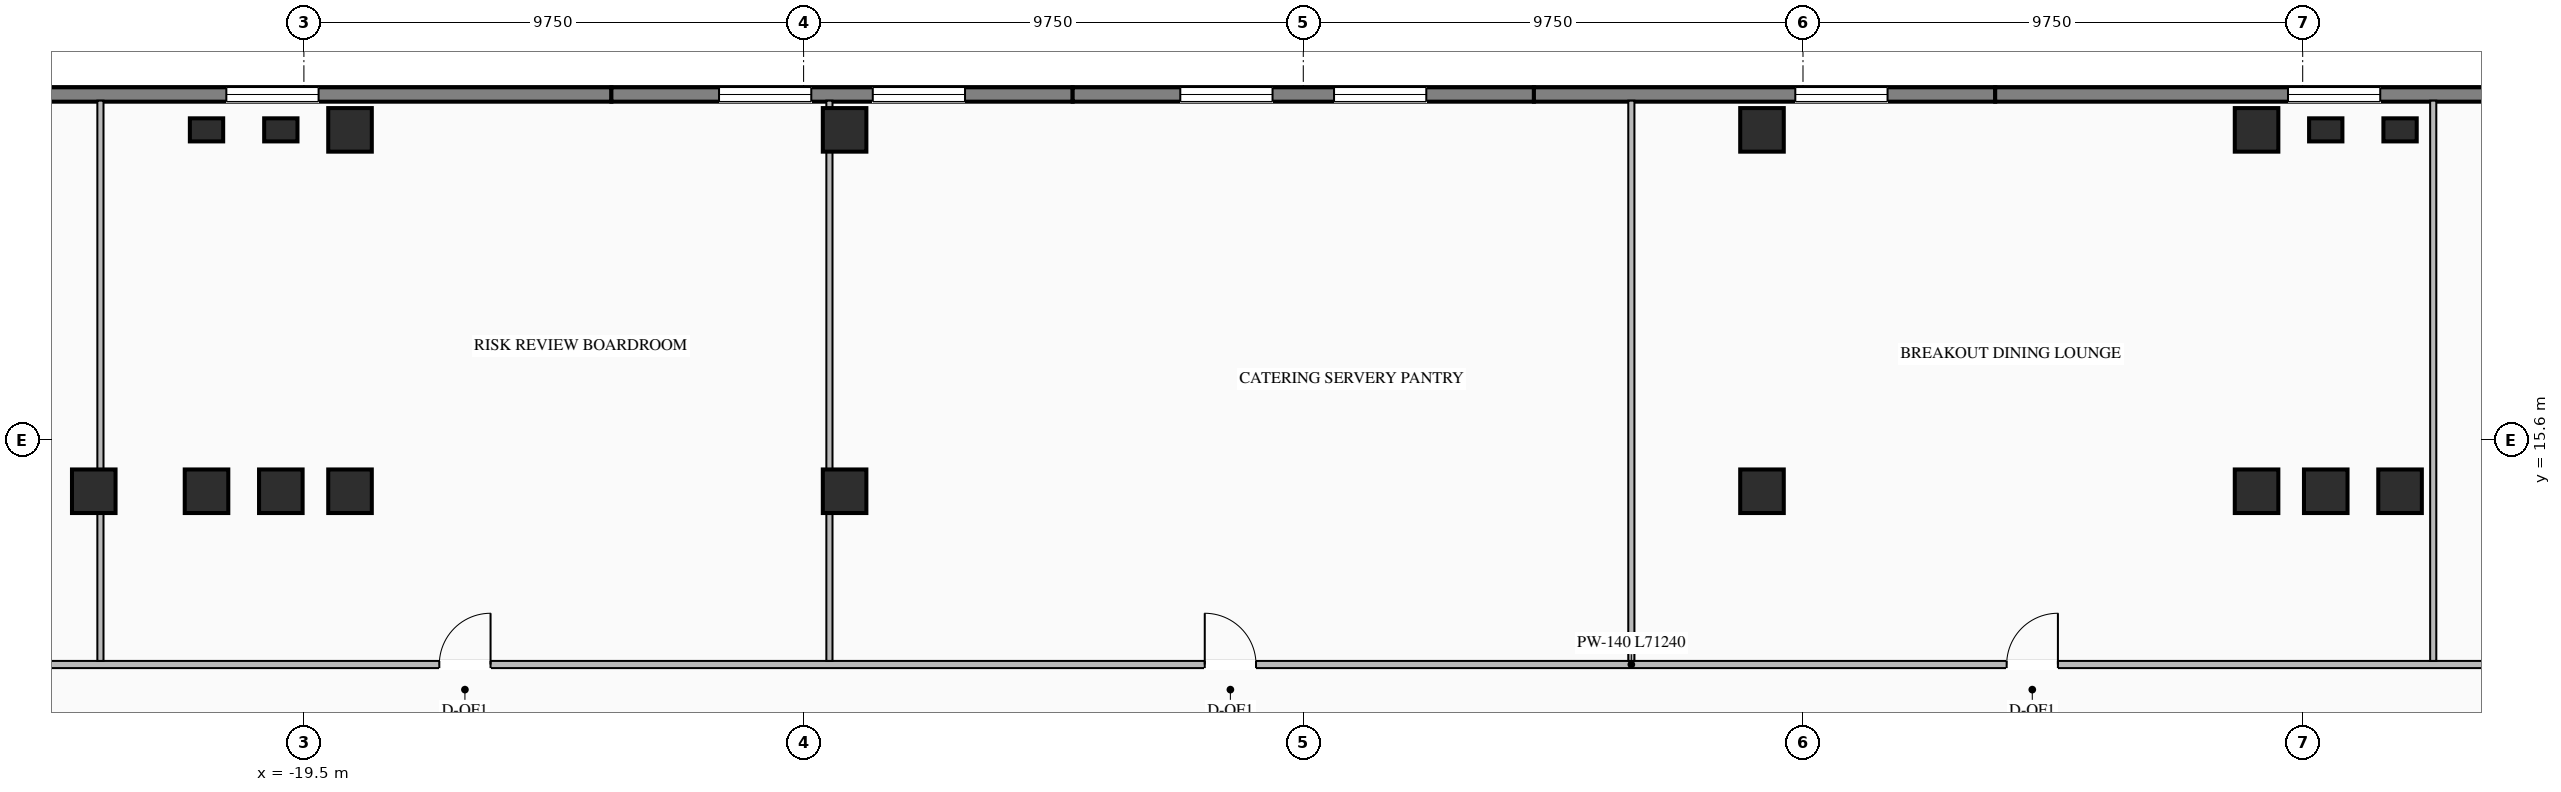
"""IFC4 building model, lengths in metres.
Left out: names, types, materials, properties, quantities, classifications, styles, units other than length and angle.
Written with IfcOpenShell. Run it as: python <this file> out.ifc"""

import sys

from ifc_helpers import new_model, si_unit, direction, frame, frame_2d, origin, origin_2d, place, context, subcontext, project, spatial, rectangle, i_section, extrude, element, fill, save


model = new_model("IFC4")
c1 = context("Model", 3, precision=1e-05, world=origin(), true_north=direction((0.0, 1.0)))
c2 = subcontext(c1, "Body", "Model", "MODEL_VIEW")
j1 = project(units=[si_unit("LENGTHUNIT", "METRE"), si_unit("PLANEANGLEUNIT", "RADIAN")], contexts=[c1])
p1 = place(None, origin())
s1 = spatial("IfcSite", under=j1, at=p1, CompositionType="ELEMENT")
p2 = place(p1, origin())
s2 = spatial("IfcBuilding", under=s1, at=p2, CompositionType="ELEMENT")
p3 = place(p2, frame((0.0, 0.0, 41.55)))
s3 = spatial("IfcBuildingStorey", under=s2, at=p3, CompositionType="ELEMENT", Elevation=41.55)
for number, where, z_axis, x_axis in (
    (1, (-21.4, 14.6, 0.0), (0.0, 0.0, 1.0), (1.0, 0.0, 0.0)),
    (2, (-19.95, 14.6, 0.0), (0.0, 0.0, 1.0), (1.0, 0.0, 0.0)),
    (3, (-18.6, 14.6, 0.0), (0.0, 0.0, 1.0), (1.0, 0.0, 0.0)),
    (4, (-8.95, 14.6, 0.0), (0.0, 0.0, 1.0), (1.0, 0.0, 0.0)),
    (5, (8.95, 14.6, 0.0), (0.0, 0.0, 1.0), (1.0, 0.0, 0.0)),
    (6, (18.6, 14.6, 0.0), (0.0, 0.0, 1.0), (1.0, 0.0, 0.0)),
    (7, (19.95, 14.6, 0.0), (0.0, 0.0, 1.0), (1.0, 0.0, 0.0)),
    (8, (21.4, 14.6, 0.0), (0.0, 0.0, 1.0), (1.0, 0.0, 0.0)),
    (9, (-23.6, 14.6, 0.0), (0.0, 0.0, 1.0), (1.0, 0.0, 0.0)),
    (10, (-18.6, 21.65, 0.0), (0.0, 0.0, 1.0), (1.0, 0.0, 0.0)),
    (11, (-8.95, 21.65, 0.0), (0.0, 0.0, 1.0), (1.0, 0.0, 0.0)),
    (12, (8.95, 21.65, 0.0), (0.0, 0.0, 1.0), (1.0, 0.0, 0.0)),
    (13, (18.6, 21.65, 0.0), (0.0, 0.0, 1.0), (1.0, 0.0, 0.0)),
):
    element("IfcColumn", number, at=place(p3, frame(where, z_axis=z_axis, x_axis=x_axis)), inside=s3, PredefinedType="COLUMN", context=c2, shape_type="SweptSolid", body=[
        extrude(i_section(OverallWidth=0.85, OverallDepth=0.85, WebThickness=0.032, FlangeThickness=0.048, at=origin_2d()), origin(), (0.0, 0.0, 1.0), 3.45),
    ])
for number, where, z_axis, x_axis in (
    (14, (-21.4, 21.65, 0.0), (0.0, 0.0, 1.0), (1.0, 0.0, 0.0)),
    (15, (-19.95, 21.65, 0.0), (0.0, 0.0, 1.0), (1.0, 0.0, 0.0)),
    (16, (19.95, 21.65, 0.0), (0.0, 0.0, 1.0), (1.0, 0.0, 0.0)),
    (17, (21.4, 21.65, 0.0), (0.0, 0.0, 1.0), (1.0, 0.0, 0.0)),
):
    element("IfcColumn", number, at=place(p3, frame(where, z_axis=z_axis, x_axis=x_axis)), inside=s3, PredefinedType="PILASTER", context=c2, shape_type="SweptSolid", body=[
        extrude(rectangle(XDim=0.65, YDim=0.45, at=origin_2d()), origin(), (0.0, 0.0, 1.0), 3.45),
    ])
p4 = place(p3, frame((-33.34, 22.34, 0.0), z_axis=(0.0, 0.0, 1.0), x_axis=(1.0, 0.0, 0.0)))
e18 = element("IfcWall", 18, at=p4, inside=s3, PredefinedType="STANDARD", context=c2, shape_type="SweptSolid", body=[
    extrude(rectangle(XDim=19.84, YDim=0.28, at=frame_2d((9.92, 0.0))), origin(), (0.0, 0.0, 1.0), 3.25),
])
p5 = place(p4, frame((5.713, 0.0, 0.76)))
e19 = element("IfcOpeningElement", 19, at=p5, cuts=e18, PredefinedType="OPENING", context=c2, shape_type="SweptSolid", body=[
    extrude(rectangle(XDim=1.8, YDim=1.95, at=frame_2d((0.9, 0.975))), frame((0.0, 0.15, 0.0), z_axis=(0.0, -1.0, 0.0), x_axis=(1.0, 0.0, 0.0)), (0.0, 0.0, 1.0), 0.3),
])
p6 = place(p4, frame((12.327, 0.0, 0.76)))
e20 = element("IfcOpeningElement", 20, at=p6, cuts=e18, PredefinedType="OPENING", context=c2, shape_type="SweptSolid", body=[
    extrude(rectangle(XDim=1.8, YDim=1.95, at=frame_2d((0.9, 0.975))), frame((0.0, 0.15, 0.0), z_axis=(0.0, -1.0, 0.0), x_axis=(1.0, 0.0, 0.0)), (0.0, 0.0, 1.0), 0.3),
])
p7 = place(p3, frame((-13.5, 22.34, 0.0), z_axis=(0.0, 0.0, 1.0), x_axis=(1.0, 0.0, 0.0)))
e21 = element("IfcWall", 21, at=p7, inside=s3, PredefinedType="STANDARD", context=c2, shape_type="SweptSolid", body=[
    extrude(rectangle(XDim=9.0, YDim=0.28, at=frame_2d((4.5, 0.0))), origin(), (0.0, 0.0, 1.0), 3.25),
])
p8 = place(p7, frame((2.1, 0.0, 0.76)))
e22 = element("IfcOpeningElement", 22, at=p8, cuts=e21, PredefinedType="OPENING", context=c2, shape_type="SweptSolid", body=[
    extrude(rectangle(XDim=1.8, YDim=1.95, at=frame_2d((0.9, 0.975))), frame((0.0, 0.15, 0.0), z_axis=(0.0, -1.0, 0.0), x_axis=(1.0, 0.0, 0.0)), (0.0, 0.0, 1.0), 0.3),
])
p9 = place(p7, frame((5.1, 0.0, 0.76)))
e23 = element("IfcOpeningElement", 23, at=p9, cuts=e21, PredefinedType="OPENING", context=c2, shape_type="SweptSolid", body=[
    extrude(rectangle(XDim=1.8, YDim=1.95, at=frame_2d((0.9, 0.975))), frame((0.0, 0.15, 0.0), z_axis=(0.0, -1.0, 0.0), x_axis=(1.0, 0.0, 0.0)), (0.0, 0.0, 1.0), 0.3),
])
p10 = place(p3, frame((-4.5, 22.34, 0.0), z_axis=(0.0, 0.0, 1.0), x_axis=(1.0, 0.0, 0.0)))
e24 = element("IfcWall", 24, at=p10, inside=s3, PredefinedType="STANDARD", context=c2, shape_type="SweptSolid", body=[
    extrude(rectangle(XDim=9.0, YDim=0.28, at=frame_2d((4.5, 0.0))), origin(), (0.0, 0.0, 1.0), 3.25),
])
p11 = place(p10, frame((2.1, 0.0, 0.76)))
e25 = element("IfcOpeningElement", 25, at=p11, cuts=e24, PredefinedType="OPENING", context=c2, shape_type="SweptSolid", body=[
    extrude(rectangle(XDim=1.8, YDim=1.95, at=frame_2d((0.9, 0.975))), frame((0.0, 0.15, 0.0), z_axis=(0.0, -1.0, 0.0), x_axis=(1.0, 0.0, 0.0)), (0.0, 0.0, 1.0), 0.3),
])
p12 = place(p10, frame((5.1, 0.0, 0.76)))
e26 = element("IfcOpeningElement", 26, at=p12, cuts=e24, PredefinedType="OPENING", context=c2, shape_type="SweptSolid", body=[
    extrude(rectangle(XDim=1.8, YDim=1.95, at=frame_2d((0.9, 0.975))), frame((0.0, 0.15, 0.0), z_axis=(0.0, -1.0, 0.0), x_axis=(1.0, 0.0, 0.0)), (0.0, 0.0, 1.0), 0.3),
])
p13 = place(p3, frame((4.5, 22.34, 0.0), z_axis=(0.0, 0.0, 1.0), x_axis=(1.0, 0.0, 0.0)))
e27 = element("IfcWall", 27, at=p13, inside=s3, PredefinedType="STANDARD", context=c2, shape_type="SweptSolid", body=[
    extrude(rectangle(XDim=9.0, YDim=0.28, at=frame_2d((4.5, 0.0))), origin(), (0.0, 0.0, 1.0), 3.25),
])
p14 = place(p13, frame((5.1, 0.0, 0.76)))
e28 = element("IfcOpeningElement", 28, at=p14, cuts=e27, PredefinedType="OPENING", context=c2, shape_type="SweptSolid", body=[
    extrude(rectangle(XDim=1.8, YDim=1.95, at=frame_2d((0.9, 0.975))), frame((0.0, 0.15, 0.0), z_axis=(0.0, -1.0, 0.0), x_axis=(1.0, 0.0, 0.0)), (0.0, 0.0, 1.0), 0.3),
])
p15 = place(p3, frame((13.5, 22.34, 0.0), z_axis=(0.0, 0.0, 1.0), x_axis=(1.0, 0.0, 0.0)))
e29 = element("IfcWall", 29, at=p15, inside=s3, PredefinedType="STANDARD", context=c2, shape_type="SweptSolid", body=[
    extrude(rectangle(XDim=19.84, YDim=0.28, at=frame_2d((9.92, 0.0))), origin(), (0.0, 0.0, 1.0), 3.25),
])
p16 = place(p15, frame((5.713, 0.0, 0.76)))
e30 = element("IfcOpeningElement", 30, at=p16, cuts=e29, PredefinedType="OPENING", context=c2, shape_type="SweptSolid", body=[
    extrude(rectangle(XDim=1.8, YDim=1.95, at=frame_2d((0.9, 0.975))), frame((0.0, 0.15, 0.0), z_axis=(0.0, -1.0, 0.0), x_axis=(1.0, 0.0, 0.0)), (0.0, 0.0, 1.0), 0.3),
])
p17 = place(p15, frame((12.327, 0.0, 0.76)))
e31 = element("IfcOpeningElement", 31, at=p17, cuts=e29, PredefinedType="OPENING", context=c2, shape_type="SweptSolid", body=[
    extrude(rectangle(XDim=1.8, YDim=1.95, at=frame_2d((0.9, 0.975))), frame((0.0, 0.15, 0.0), z_axis=(0.0, -1.0, 0.0), x_axis=(1.0, 0.0, 0.0)), (0.0, 0.0, 1.0), 0.3),
])
p18 = place(p3, frame((-35.62, 11.22, 0.0), z_axis=(0.0, 0.0, 1.0), x_axis=(1.0, 0.0, 0.0)))
e32 = element("IfcWall", 32, at=p18, inside=s3, PredefinedType="STANDARD", context=c2, shape_type="SweptSolid", body=[
    extrude(rectangle(XDim=71.24, YDim=0.14, at=frame_2d((35.62, 0.0))), origin(), (0.0, 0.0, 1.0), 3.25),
])
p19 = place(p18, frame((5.701, 0.0, 0.0)))
e33 = element("IfcOpeningElement", 33, at=p19, cuts=e32, PredefinedType="OPENING", context=c2, shape_type="SweptSolid", body=[
    extrude(rectangle(XDim=1.0, YDim=2.08, at=frame_2d((0.5, 1.04))), frame((0.0, 0.08, 0.0), z_axis=(0.0, -1.0, 0.0), x_axis=(1.0, 0.0, 0.0)), (0.0, 0.0, 1.0), 0.16),
])
p20 = place(p18, frame((18.762, 0.0, 0.0)))
e34 = element("IfcOpeningElement", 34, at=p20, cuts=e32, PredefinedType="OPENING", context=c2, shape_type="SweptSolid", body=[
    extrude(rectangle(XDim=1.0, YDim=2.08, at=frame_2d((0.5, 1.04))), frame((0.0, 0.08, 0.0), z_axis=(0.0, -1.0, 0.0), x_axis=(1.0, 0.0, 0.0)), (0.0, 0.0, 1.0), 0.16),
])
p21 = place(p18, frame((33.698, 0.0, 0.0)))
e35 = element("IfcOpeningElement", 35, at=p21, cuts=e32, PredefinedType="OPENING", context=c2, shape_type="SweptSolid", body=[
    extrude(rectangle(XDim=1.0, YDim=2.08, at=frame_2d((0.5, 1.04))), frame((0.0, 0.08, 0.0), z_axis=(0.0, -1.0, 0.0), x_axis=(1.0, 0.0, 0.0)), (0.0, 0.0, 1.0), 0.16),
])
p22 = place(p18, frame((49.344, 0.0, 0.0)))
e36 = element("IfcOpeningElement", 36, at=p22, cuts=e32, PredefinedType="OPENING", context=c2, shape_type="SweptSolid", body=[
    extrude(rectangle(XDim=1.0, YDim=2.08, at=frame_2d((0.5, 1.04))), frame((0.0, 0.08, 0.0), z_axis=(0.0, -1.0, 0.0), x_axis=(1.0, 0.0, 0.0)), (0.0, 0.0, 1.0), 0.16),
])
p23 = place(p18, frame((63.827, 0.0, 0.0)))
e37 = element("IfcOpeningElement", 37, at=p23, cuts=e32, PredefinedType="OPENING", context=c2, shape_type="SweptSolid", body=[
    extrude(rectangle(XDim=1.0, YDim=2.08, at=frame_2d((0.5, 1.04))), frame((0.0, 0.08, 0.0), z_axis=(0.0, -1.0, 0.0), x_axis=(1.0, 0.0, 0.0)), (0.0, 0.0, 1.0), 0.16),
])
p24 = place(p3, frame((-23.47, 11.29, 0.0), z_axis=(0.0, 0.0, 1.0), x_axis=(0.0, 1.0, 0.0)))
e38 = element("IfcWall", 38, at=p24, inside=s3, PredefinedType="STANDARD", context=c2, shape_type="SweptSolid", body=[
    extrude(rectangle(XDim=10.93, YDim=0.12, at=frame_2d((5.465, 0.0))), origin(), (0.0, 0.0, 1.0), 2.645),
])
for number, where, z_axis, x_axis in (
    (39, (-9.246, 11.29, 0.0), (0.0, 0.0, 1.0), (0.0, 1.0, 0.0)),
    (40, (6.401, 11.29, 0.0), (0.0, 0.0, 1.0), (0.0, 1.0, 0.0)),
    (41, (22.047, 11.29, 0.0), (0.0, 0.0, 1.0), (0.0, 1.0, 0.0)),
):
    element("IfcWall", number, at=place(p3, frame(where, z_axis=z_axis, x_axis=x_axis)), inside=s3, PredefinedType="STANDARD", context=c2, shape_type="SweptSolid", body=[
        extrude(rectangle(XDim=10.93, YDim=0.12, at=frame_2d((5.465, 0.0))), origin(), (0.0, 0.0, 1.0), 3.25),
    ])
p25 = place(p6, origin())
e42 = element("IfcWindow", 42, at=p25, inside=s3, PartitioningType="SINGLE_PANEL", PredefinedType="WINDOW", context=c2, shape_type="SweptSolid", body=[
    extrude(rectangle(XDim=1.8, YDim=1.95, at=frame_2d((0.9, 0.975))), frame((0.0, 0.03, 0.0), z_axis=(0.0, -1.0, 0.0), x_axis=(1.0, 0.0, 0.0)), (0.0, 0.0, 1.0), 0.06),
])
fill(e20, e42)
p26 = place(p8, origin())
e43 = element("IfcWindow", 43, at=p26, inside=s3, PartitioningType="SINGLE_PANEL", PredefinedType="WINDOW", context=c2, shape_type="SweptSolid", body=[
    extrude(rectangle(XDim=1.8, YDim=1.95, at=frame_2d((0.9, 0.975))), frame((0.0, 0.03, 0.0), z_axis=(0.0, -1.0, 0.0), x_axis=(1.0, 0.0, 0.0)), (0.0, 0.0, 1.0), 0.06),
])
fill(e22, e43)
p27 = place(p9, origin())
e44 = element("IfcWindow", 44, at=p27, inside=s3, PartitioningType="SINGLE_PANEL", PredefinedType="WINDOW", context=c2, shape_type="SweptSolid", body=[
    extrude(rectangle(XDim=1.8, YDim=1.95, at=frame_2d((0.9, 0.975))), frame((0.0, 0.03, 0.0), z_axis=(0.0, -1.0, 0.0), x_axis=(1.0, 0.0, 0.0)), (0.0, 0.0, 1.0), 0.06),
])
fill(e23, e44)
p28 = place(p11, origin())
e45 = element("IfcWindow", 45, at=p28, inside=s3, PartitioningType="SINGLE_PANEL", PredefinedType="WINDOW", context=c2, shape_type="SweptSolid", body=[
    extrude(rectangle(XDim=1.8, YDim=1.95, at=frame_2d((0.9, 0.975))), frame((0.0, 0.03, 0.0), z_axis=(0.0, -1.0, 0.0), x_axis=(1.0, 0.0, 0.0)), (0.0, 0.0, 1.0), 0.06),
])
fill(e25, e45)
p29 = place(p12, origin())
e46 = element("IfcWindow", 46, at=p29, inside=s3, PartitioningType="SINGLE_PANEL", PredefinedType="WINDOW", context=c2, shape_type="SweptSolid", body=[
    extrude(rectangle(XDim=1.8, YDim=1.95, at=frame_2d((0.9, 0.975))), frame((0.0, 0.03, 0.0), z_axis=(0.0, -1.0, 0.0), x_axis=(1.0, 0.0, 0.0)), (0.0, 0.0, 1.0), 0.06),
])
fill(e26, e46)
p30 = place(p14, origin())
e47 = element("IfcWindow", 47, at=p30, inside=s3, PartitioningType="SINGLE_PANEL", PredefinedType="WINDOW", context=c2, shape_type="SweptSolid", body=[
    extrude(rectangle(XDim=1.8, YDim=1.95, at=frame_2d((0.9, 0.975))), frame((0.0, 0.03, 0.0), z_axis=(0.0, -1.0, 0.0), x_axis=(1.0, 0.0, 0.0)), (0.0, 0.0, 1.0), 0.06),
])
fill(e28, e47)
p31 = place(p16, origin())
e48 = element("IfcWindow", 48, at=p31, inside=s3, PartitioningType="SINGLE_PANEL", PredefinedType="WINDOW", context=c2, shape_type="SweptSolid", body=[
    extrude(rectangle(XDim=1.8, YDim=1.95, at=frame_2d((0.9, 0.975))), frame((0.0, 0.03, 0.0), z_axis=(0.0, -1.0, 0.0), x_axis=(1.0, 0.0, 0.0)), (0.0, 0.0, 1.0), 0.06),
])
fill(e30, e48)
p32 = place(p20, origin())
e49 = element("IfcDoor", 49, at=p32, inside=s3, OperationType="SINGLE_SWING_RIGHT", PredefinedType="DOOR", context=c2, shape_type="SweptSolid", body=[
    extrude(rectangle(XDim=1.0, YDim=2.08, at=frame_2d((0.5, 1.04))), frame((0.0, 0.025, 0.0), z_axis=(0.0, -1.0, 0.0), x_axis=(1.0, 0.0, 0.0)), (0.0, 0.0, 1.0), 0.05),
])
fill(e34, e49)
p33 = place(p21, origin())
e50 = element("IfcDoor", 50, at=p33, inside=s3, OperationType="SINGLE_SWING_LEFT", PredefinedType="DOOR", context=c2, shape_type="SweptSolid", body=[
    extrude(rectangle(XDim=1.0, YDim=2.08, at=frame_2d((0.5, 1.04))), frame((0.0, 0.025, 0.0), z_axis=(0.0, -1.0, 0.0), x_axis=(1.0, 0.0, 0.0)), (0.0, 0.0, 1.0), 0.05),
])
fill(e35, e50)
p34 = place(p22, origin())
e51 = element("IfcDoor", 51, at=p34, inside=s3, OperationType="SINGLE_SWING_RIGHT", PredefinedType="DOOR", context=c2, shape_type="SweptSolid", body=[
    extrude(rectangle(XDim=1.0, YDim=2.08, at=frame_2d((0.5, 1.04))), frame((0.0, 0.025, 0.0), z_axis=(0.0, -1.0, 0.0), x_axis=(1.0, 0.0, 0.0)), (0.0, 0.0, 1.0), 0.05),
])
fill(e36, e51)
save(model, sys.argv[1])
